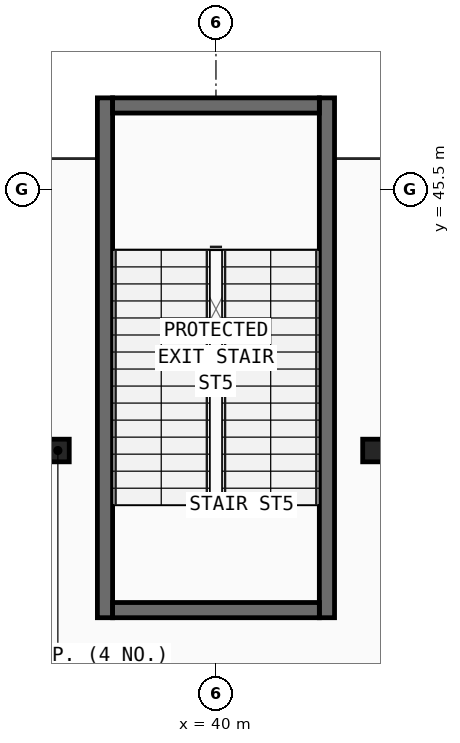
"""IFC4 building model, lengths in metres.
Left out: names, types, materials, properties, quantities, classifications, styles, units other than length and angle.
Written with IfcOpenShell. Run it as: python <this file> out.ifc"""

import sys

from ifc_helpers import new_model, si_unit, direction, frame, frame_2d, origin, origin_2d, place, context, subcontext, project, spatial, rectangle, i_section, extrude, element, save


model = new_model("IFC4")
c1 = context("Model", 3, precision=1e-05, world=origin(), true_north=direction((0.0, 1.0)))
c2 = subcontext(c1, "Body", "Model", "MODEL_VIEW")
j1 = project(units=[si_unit("LENGTHUNIT", "METRE"), si_unit("PLANEANGLEUNIT", "RADIAN")], contexts=[c1])
p1 = place(None, origin())
s1 = spatial("IfcSite", under=j1, at=p1, CompositionType="ELEMENT")
p2 = place(p1, origin())
s2 = spatial("IfcBuilding", under=s1, at=p2, CompositionType="ELEMENT")
p3 = place(p2, frame((0.0, 0.0, 5.5)))
s3 = spatial("IfcBuildingStorey", under=s2, at=p3, CompositionType="ELEMENT", Elevation=5.5)
for number, where, z_axis, x_axis in (
    (1, (37.4, 41.2, 0.0), (0.0, 0.0, 1.0), (1.0, 0.0, 0.0)),
    (2, (42.6, 41.2, 0.0), (0.0, 0.0, 1.0), (1.0, 0.0, 0.0)),
):
    element("IfcColumn", number, at=place(p3, frame(where, z_axis=z_axis, x_axis=x_axis)), inside=s3, PredefinedType="COLUMN", context=c2, shape_type="SweptSolid", body=[
        extrude(i_section(OverallWidth=0.374, OverallDepth=0.372, WebThickness=0.016, FlangeThickness=0.026, at=origin_2d()), origin(), (0.0, 0.0, 1.0), 5.5),
    ])
for number, where, z_axis, x_axis in (
    (3, (38.175, 38.45, 0.0), (0.0, 0.0, 1.0), (0.0, 1.0, 0.0)),
    (4, (41.825, 38.45, 0.0), (0.0, 0.0, 1.0), (0.0, 1.0, 0.0)),
):
    element("IfcWall", number, at=place(p3, frame(where, z_axis=z_axis, x_axis=x_axis)), inside=s3, PredefinedType="SHEAR", context=c2, shape_type="SweptSolid", body=[
        extrude(rectangle(XDim=8.55, YDim=0.25, at=frame_2d((4.275, 0.0))), origin(), (0.0, 0.0, 1.0), 5.18),
    ])
for number, where, z_axis, x_axis in (
    (5, (38.3, 38.575, 0.0), (0.0, 0.0, 1.0), (1.0, 0.0, 0.0)),
    (6, (38.3, 46.875, 0.0), (0.0, 0.0, 1.0), (1.0, 0.0, 0.0)),
):
    element("IfcWall", number, at=place(p3, frame(where, z_axis=z_axis, x_axis=x_axis)), inside=s3, PredefinedType="SHEAR", context=c2, shape_type="SweptSolid", body=[
        extrude(rectangle(XDim=3.4, YDim=0.25, at=frame_2d((1.7, 0.0))), origin(), (0.0, 0.0, 1.0), 5.18),
    ])
save(model, sys.argv[1])
